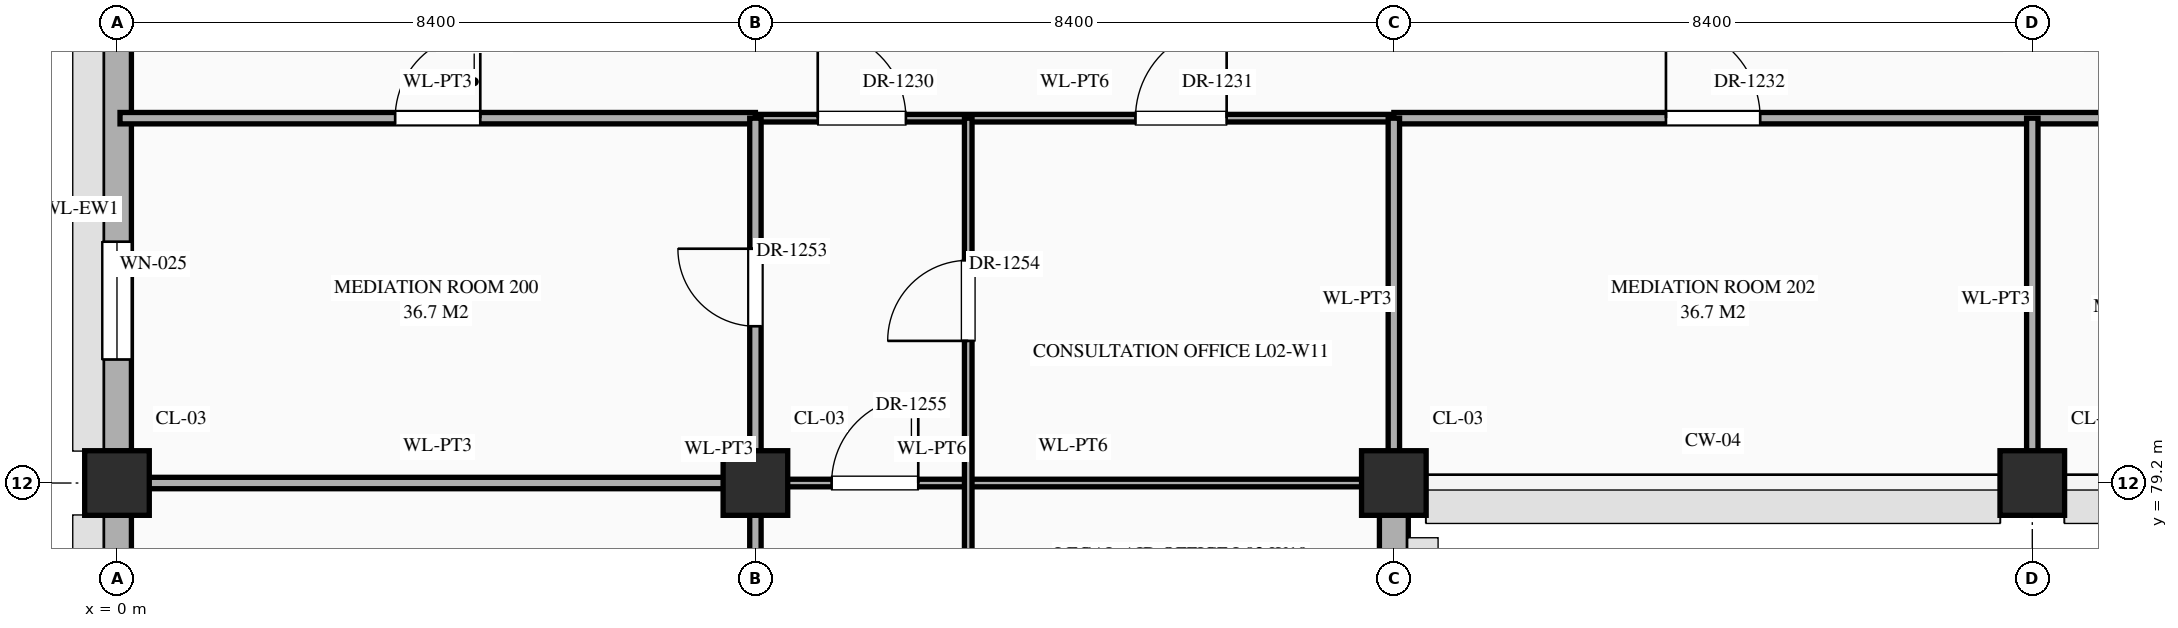
"""IFC4 building model, lengths in metres.
Left out: names, types, materials, properties, quantities, classifications, styles, units other than length and angle.
Written with IfcOpenShell. Run it as: python <this file> out.ifc"""

import sys

from ifc_helpers import new_model, si_unit, direction, frame, frame_2d, origin, origin_2d, place, context, subcontext, project, spatial, rectangle, extrude, element, fill, save


model = new_model("IFC4")
c1 = context("Model", 3, precision=1e-05, world=origin(), true_north=direction((0.0, 1.0)))
c2 = subcontext(c1, "Body", "Model", "MODEL_VIEW")
j1 = project(units=[si_unit("LENGTHUNIT", "METRE"), si_unit("PLANEANGLEUNIT", "RADIAN")], contexts=[c1])
p1 = place(None, origin())
s1 = spatial("IfcSite", under=j1, at=p1, CompositionType="ELEMENT")
p2 = place(p1, origin())
s2 = spatial("IfcBuilding", under=s1, at=p2, CompositionType="ELEMENT")
p3 = place(p2, frame((0.0, 0.0, 5.4)))
s3 = spatial("IfcBuildingStorey", under=s2, at=p3, CompositionType="ELEMENT", Elevation=5.4)
for number, where, z_axis, x_axis in (
    (1, (0.0, 79.2, 0.0), (0.0, 0.0, 1.0), (1.0, 0.0, 0.0)),
    (2, (8.4, 79.2, 0.0), (0.0, 0.0, 1.0), (1.0, 0.0, 0.0)),
    (3, (16.8, 79.2, 0.0), (0.0, 0.0, 1.0), (1.0, 0.0, 0.0)),
    (4, (25.2, 79.2, 0.0), (0.0, 0.0, 1.0), (1.0, 0.0, 0.0)),
):
    element("IfcColumn", number, at=place(p3, frame(where, z_axis=z_axis, x_axis=x_axis)), inside=s3, PredefinedType="COLUMN", context=c2, shape_type="SweptSolid", body=[
        extrude(rectangle(XDim=0.85, YDim=0.85, at=origin_2d()), origin(), (0.0, 0.0, 1.0), 5.4),
    ])
p4 = place(p3, frame((0.0, 72.42, 0.0), z_axis=(0.0, 0.0, 1.0), x_axis=(0.0, 1.0, 0.0)))
e5 = element("IfcWall", 5, at=p4, inside=s3, PredefinedType="STANDARD", context=c2, shape_type="SweptSolid", body=[
    extrude(rectangle(XDim=6.36, YDim=0.38, at=frame_2d((3.18, 0.0))), origin(), (0.0, 0.0, 1.0), 4.47),
])
p5 = place(p4, frame((2.405, 0.0, 0.85)))
e6 = element("IfcOpeningElement", 6, at=p5, cuts=e5, PredefinedType="OPENING", context=c2, shape_type="SweptSolid", body=[
    extrude(rectangle(XDim=1.55, YDim=1.2, at=frame_2d((0.775, 0.6))), frame((0.0, 0.202, 0.0), z_axis=(0.0, -1.0, 0.0), x_axis=(1.0, 0.0, 0.0)), (0.0, 0.0, 1.0), 0.404),
])
p6 = place(p3, frame((0.0, 79.62, 0.0), z_axis=(0.0, 0.0, 1.0), x_axis=(0.0, 1.0, 0.0)))
e7 = element("IfcWall", 7, at=p6, inside=s3, PredefinedType="STANDARD", context=c2, shape_type="SweptSolid", body=[
    extrude(rectangle(XDim=6.36, YDim=0.38, at=frame_2d((3.18, 0.0))), origin(), (0.0, 0.0, 1.0), 4.47),
])
p7 = place(p6, frame((1.205, 0.0, 0.85)))
e8 = element("IfcOpeningElement", 8, at=p7, cuts=e7, PredefinedType="OPENING", context=c2, shape_type="SweptSolid", body=[
    extrude(rectangle(XDim=1.55, YDim=1.38, at=frame_2d((0.775, 0.69))), frame((0.0, 0.202, 0.0), z_axis=(0.0, -1.0, 0.0), x_axis=(1.0, 0.0, 0.0)), (0.0, 0.0, 1.0), 0.404),
])
p8 = place(p3, frame((16.8, 72.42, 0.0), z_axis=(0.0, 0.0, 1.0), x_axis=(0.0, 1.0, 0.0)))
e9 = element("IfcWall", 9, at=p8, inside=s3, PredefinedType="STANDARD", context=c2, shape_type="SweptSolid", body=[
    extrude(rectangle(XDim=6.36, YDim=0.38, at=frame_2d((3.18, 0.0))), origin(), (0.0, 0.0, 1.0), 4.47),
])
p9 = place(p8, frame((2.505, 0.0, 0.85)))
e10 = element("IfcOpeningElement", 10, at=p9, cuts=e9, PredefinedType="OPENING", context=c2, shape_type="SweptSolid", body=[
    extrude(rectangle(XDim=1.35, YDim=1.92, at=frame_2d((0.675, 0.96))), frame((0.0, 0.202, 0.0), z_axis=(0.0, -1.0, 0.0), x_axis=(1.0, 0.0, 0.0)), (0.0, 0.0, 1.0), 0.404),
])
p10 = place(p3, frame((0.04, 79.2, 0.0), z_axis=(0.0, 0.0, 1.0), x_axis=(1.0, 0.0, 0.0)))
e11 = element("IfcWall", 11, at=p10, inside=s3, PredefinedType="STANDARD", context=c2, shape_type="SweptSolid", body=[
    extrude(rectangle(XDim=8.36, YDim=0.15, at=frame_2d((4.18, 0.0))), origin(), (0.0, 0.0, 1.0), 4.27),
])
p11 = place(p3, frame((8.4, 79.2, 0.0), z_axis=(0.0, 0.0, 1.0), x_axis=(1.0, 0.0, 0.0)))
e12 = element("IfcWall", 12, at=p11, inside=s3, PredefinedType="STANDARD", context=c2, shape_type="SweptSolid", body=[
    extrude(rectangle(XDim=8.36, YDim=0.1, at=frame_2d((4.18, 0.0))), origin(), (0.0, 0.0, 1.0), 4.27),
])
p12 = place(p11, frame((1.002, 0.0, 0.0)))
e13 = element("IfcOpeningElement", 13, at=p12, cuts=e12, PredefinedType="OPENING", context=c2, shape_type="SweptSolid", body=[
    extrude(rectangle(XDim=1.14, YDim=2.4, at=frame_2d((0.57, 1.2))), frame((0.0, 0.062, 0.0), z_axis=(0.0, -1.0, 0.0), x_axis=(1.0, 0.0, 0.0)), (0.0, 0.0, 1.0), 0.124),
])
p13 = place(p3, frame((0.04, 84.0, 0.0), z_axis=(0.0, 0.0, 1.0), x_axis=(1.0, 0.0, 0.0)))
e14 = element("IfcWall", 14, at=p13, inside=s3, PredefinedType="STANDARD", context=c2, shape_type="SweptSolid", body=[
    extrude(rectangle(XDim=8.36, YDim=0.15, at=frame_2d((4.18, 0.0))), origin(), (0.0, 0.0, 1.0), 5.12),
])
p14 = place(p13, frame((3.62, 0.0, 0.0)))
e15 = element("IfcOpeningElement", 15, at=p14, cuts=e14, PredefinedType="OPENING", context=c2, shape_type="SweptSolid", body=[
    extrude(rectangle(XDim=1.12, YDim=2.25, at=frame_2d((0.56, 1.125))), frame((0.0, 0.087, 0.0), z_axis=(0.0, -1.0, 0.0), x_axis=(1.0, 0.0, 0.0)), (0.0, 0.0, 1.0), 0.174),
])
p15 = place(p3, frame((8.4, 84.0, 0.0), z_axis=(0.0, 0.0, 1.0), x_axis=(1.0, 0.0, 0.0)))
e16 = element("IfcWall", 16, at=p15, inside=s3, PredefinedType="STANDARD", context=c2, shape_type="SweptSolid", body=[
    extrude(rectangle(XDim=8.4, YDim=0.1, at=frame_2d((4.2, 0.0))), origin(), (0.0, 0.0, 1.0), 5.12),
])
p16 = place(p15, frame((0.82, 0.0, 0.0)))
e17 = element("IfcOpeningElement", 17, at=p16, cuts=e16, PredefinedType="OPENING", context=c2, shape_type="SweptSolid", body=[
    extrude(rectangle(XDim=1.16, YDim=2.3, at=frame_2d((0.58, 1.15))), frame((0.0, 0.062, 0.0), z_axis=(0.0, -1.0, 0.0), x_axis=(1.0, 0.0, 0.0)), (0.0, 0.0, 1.0), 0.124),
])
p17 = place(p15, frame((5.0, 0.0, 0.0)))
e18 = element("IfcOpeningElement", 18, at=p17, cuts=e16, PredefinedType="OPENING", context=c2, shape_type="SweptSolid", body=[
    extrude(rectangle(XDim=1.2, YDim=2.35, at=frame_2d((0.6, 1.175))), frame((0.0, 0.062, 0.0), z_axis=(0.0, -1.0, 0.0), x_axis=(1.0, 0.0, 0.0)), (0.0, 0.0, 1.0), 0.124),
])
p18 = place(p3, frame((16.8, 84.0, 0.0), z_axis=(0.0, 0.0, 1.0), x_axis=(1.0, 0.0, 0.0)))
e19 = element("IfcWall", 19, at=p18, inside=s3, PredefinedType="STANDARD", context=c2, shape_type="SweptSolid", body=[
    extrude(rectangle(XDim=134.4, YDim=0.15, at=frame_2d((67.2, 0.0))), origin(), (0.0, 0.0, 1.0), 5.12),
])
p19 = place(p18, frame((3.58, 0.0, 0.0)))
e20 = element("IfcOpeningElement", 20, at=p19, cuts=e19, PredefinedType="OPENING", context=c2, shape_type="SweptSolid", body=[
    extrude(rectangle(XDim=1.24, YDim=2.3, at=frame_2d((0.62, 1.15))), frame((0.0, 0.087, 0.0), z_axis=(0.0, -1.0, 0.0), x_axis=(1.0, 0.0, 0.0)), (0.0, 0.0, 1.0), 0.174),
])
p20 = place(p18, frame((11.96, 0.0, 0.0)))
e21 = element("IfcOpeningElement", 21, at=p20, cuts=e19, PredefinedType="OPENING", context=c2, shape_type="SweptSolid", body=[
    extrude(rectangle(XDim=1.28, YDim=2.35, at=frame_2d((0.64, 1.175))), frame((0.0, 0.087, 0.0), z_axis=(0.0, -1.0, 0.0), x_axis=(1.0, 0.0, 0.0)), (0.0, 0.0, 1.0), 0.174),
])
p21 = place(p18, frame((20.53, 0.0, 0.0)))
e22 = element("IfcOpeningElement", 22, at=p21, cuts=e19, PredefinedType="OPENING", context=c2, shape_type="SweptSolid", body=[
    extrude(rectangle(XDim=0.94, YDim=2.3, at=frame_2d((0.47, 1.15))), frame((0.0, 0.087, 0.0), z_axis=(0.0, -1.0, 0.0), x_axis=(1.0, 0.0, 0.0)), (0.0, 0.0, 1.0), 0.174),
])
p22 = place(p18, frame((28.91, 0.0, 0.0)))
e23 = element("IfcOpeningElement", 23, at=p22, cuts=e19, PredefinedType="OPENING", context=c2, shape_type="SweptSolid", body=[
    extrude(rectangle(XDim=0.98, YDim=2.35, at=frame_2d((0.49, 1.175))), frame((0.0, 0.087, 0.0), z_axis=(0.0, -1.0, 0.0), x_axis=(1.0, 0.0, 0.0)), (0.0, 0.0, 1.0), 0.174),
])
p23 = place(p18, frame((37.27, 0.0, 0.0)))
e24 = element("IfcOpeningElement", 24, at=p23, cuts=e19, PredefinedType="OPENING", context=c2, shape_type="SweptSolid", body=[
    extrude(rectangle(XDim=1.06, YDim=2.4, at=frame_2d((0.53, 1.2))), frame((0.0, 0.087, 0.0), z_axis=(0.0, -1.0, 0.0), x_axis=(1.0, 0.0, 0.0)), (0.0, 0.0, 1.0), 0.174),
])
p24 = place(p18, frame((45.63, 0.0, 0.0)))
e25 = element("IfcOpeningElement", 25, at=p24, cuts=e19, PredefinedType="OPENING", context=c2, shape_type="SweptSolid", body=[
    extrude(rectangle(XDim=1.14, YDim=2.4, at=frame_2d((0.57, 1.2))), frame((0.0, 0.087, 0.0), z_axis=(0.0, -1.0, 0.0), x_axis=(1.0, 0.0, 0.0)), (0.0, 0.0, 1.0), 0.174),
])
p25 = place(p18, frame((54.15, 0.0, 0.0)))
e26 = element("IfcOpeningElement", 26, at=p25, cuts=e19, PredefinedType="OPENING", context=c2, shape_type="SweptSolid", body=[
    extrude(rectangle(XDim=0.9, YDim=2.15, at=frame_2d((0.45, 1.075))), frame((0.0, 0.087, 0.0), z_axis=(0.0, -1.0, 0.0), x_axis=(1.0, 0.0, 0.0)), (0.0, 0.0, 1.0), 0.174),
])
p26 = place(p18, frame((62.57, 0.0, 0.0)))
e27 = element("IfcOpeningElement", 27, at=p26, cuts=e19, PredefinedType="OPENING", context=c2, shape_type="SweptSolid", body=[
    extrude(rectangle(XDim=0.86, YDim=2.1, at=frame_2d((0.43, 1.05))), frame((0.0, 0.087, 0.0), z_axis=(0.0, -1.0, 0.0), x_axis=(1.0, 0.0, 0.0)), (0.0, 0.0, 1.0), 0.174),
])
p27 = place(p18, frame((70.92, 0.0, 0.0)))
e28 = element("IfcOpeningElement", 28, at=p27, cuts=e19, PredefinedType="OPENING", context=c2, shape_type="SweptSolid", body=[
    extrude(rectangle(XDim=0.96, YDim=2.2, at=frame_2d((0.48, 1.1))), frame((0.0, 0.087, 0.0), z_axis=(0.0, -1.0, 0.0), x_axis=(1.0, 0.0, 0.0)), (0.0, 0.0, 1.0), 0.174),
])
p28 = place(p18, frame((79.3, 0.0, 0.0)))
e29 = element("IfcOpeningElement", 29, at=p28, cuts=e19, PredefinedType="OPENING", context=c2, shape_type="SweptSolid", body=[
    extrude(rectangle(XDim=1.0, YDim=2.25, at=frame_2d((0.5, 1.125))), frame((0.0, 0.087, 0.0), z_axis=(0.0, -1.0, 0.0), x_axis=(1.0, 0.0, 0.0)), (0.0, 0.0, 1.0), 0.174),
])
p29 = place(p18, frame((87.68, 0.0, 0.0)))
e30 = element("IfcOpeningElement", 30, at=p29, cuts=e19, PredefinedType="OPENING", context=c2, shape_type="SweptSolid", body=[
    extrude(rectangle(XDim=1.04, YDim=2.2, at=frame_2d((0.52, 1.1))), frame((0.0, 0.087, 0.0), z_axis=(0.0, -1.0, 0.0), x_axis=(1.0, 0.0, 0.0)), (0.0, 0.0, 1.0), 0.174),
])
p30 = place(p18, frame((96.06, 0.0, 0.0)))
e31 = element("IfcOpeningElement", 31, at=p30, cuts=e19, PredefinedType="OPENING", context=c2, shape_type="SweptSolid", body=[
    extrude(rectangle(XDim=1.08, YDim=2.25, at=frame_2d((0.54, 1.125))), frame((0.0, 0.087, 0.0), z_axis=(0.0, -1.0, 0.0), x_axis=(1.0, 0.0, 0.0)), (0.0, 0.0, 1.0), 0.174),
])
p31 = place(p18, frame((104.44, 0.0, 0.0)))
e32 = element("IfcOpeningElement", 32, at=p31, cuts=e19, PredefinedType="OPENING", context=c2, shape_type="SweptSolid", body=[
    extrude(rectangle(XDim=1.12, YDim=2.25, at=frame_2d((0.56, 1.125))), frame((0.0, 0.087, 0.0), z_axis=(0.0, -1.0, 0.0), x_axis=(1.0, 0.0, 0.0)), (0.0, 0.0, 1.0), 0.174),
])
p32 = place(p18, frame((112.82, 0.0, 0.0)))
e33 = element("IfcOpeningElement", 33, at=p32, cuts=e19, PredefinedType="OPENING", context=c2, shape_type="SweptSolid", body=[
    extrude(rectangle(XDim=1.16, YDim=2.3, at=frame_2d((0.58, 1.15))), frame((0.0, 0.087, 0.0), z_axis=(0.0, -1.0, 0.0), x_axis=(1.0, 0.0, 0.0)), (0.0, 0.0, 1.0), 0.174),
])
p33 = place(p18, frame((121.2, 0.0, 0.0)))
e34 = element("IfcOpeningElement", 34, at=p33, cuts=e19, PredefinedType="OPENING", context=c2, shape_type="SweptSolid", body=[
    extrude(rectangle(XDim=1.2, YDim=2.35, at=frame_2d((0.6, 1.175))), frame((0.0, 0.087, 0.0), z_axis=(0.0, -1.0, 0.0), x_axis=(1.0, 0.0, 0.0)), (0.0, 0.0, 1.0), 0.174),
])
p34 = place(p18, frame((129.58, 0.0, 0.0)))
e35 = element("IfcOpeningElement", 35, at=p34, cuts=e19, PredefinedType="OPENING", context=c2, shape_type="SweptSolid", body=[
    extrude(rectangle(XDim=1.24, YDim=2.3, at=frame_2d((0.62, 1.15))), frame((0.0, 0.087, 0.0), z_axis=(0.0, -1.0, 0.0), x_axis=(1.0, 0.0, 0.0)), (0.0, 0.0, 1.0), 0.174),
])
p35 = place(p3, frame((8.4, 50.4, 0.0), z_axis=(0.0, 0.0, 1.0), x_axis=(0.0, 1.0, 0.0)))
e36 = element("IfcWall", 36, at=p35, inside=s3, PredefinedType="STANDARD", context=c2, shape_type="SweptSolid", body=[
    extrude(rectangle(XDim=33.6, YDim=0.15, at=frame_2d((16.8, 0.0))), origin(), (0.0, 0.0, 1.0), 4.37),
])
p36 = place(p35, frame((30.863, 0.0, 0.0)))
e37 = element("IfcOpeningElement", 37, at=p36, cuts=e36, PredefinedType="OPENING", context=c2, shape_type="SweptSolid", body=[
    extrude(rectangle(XDim=1.02, YDim=2.4, at=frame_2d((0.51, 1.2))), frame((0.0, 0.087, 0.0), z_axis=(0.0, -1.0, 0.0), x_axis=(1.0, 0.0, 0.0)), (0.0, 0.0, 1.0), 0.174),
])
p37 = place(p35, frame((3.1, 0.0, 0.0)))
e38 = element("IfcOpeningElement", 38, at=p37, cuts=e36, PredefinedType="OPENING", context=c2, shape_type="SweptSolid", body=[
    extrude(rectangle(XDim=1.0, YDim=2.25, at=frame_2d((0.5, 1.125))), frame((0.0, 0.087, 0.0), z_axis=(0.0, -1.0, 0.0), x_axis=(1.0, 0.0, 0.0)), (0.0, 0.0, 1.0), 0.174),
])
p38 = place(p35, frame((10.28, 0.0, 0.0)))
e39 = element("IfcOpeningElement", 39, at=p38, cuts=e36, PredefinedType="OPENING", context=c2, shape_type="SweptSolid", body=[
    extrude(rectangle(XDim=1.04, YDim=2.2, at=frame_2d((0.52, 1.1))), frame((0.0, 0.087, 0.0), z_axis=(0.0, -1.0, 0.0), x_axis=(1.0, 0.0, 0.0)), (0.0, 0.0, 1.0), 0.174),
])
p39 = place(p35, frame((17.46, 0.0, 0.0)))
e40 = element("IfcOpeningElement", 40, at=p39, cuts=e36, PredefinedType="OPENING", context=c2, shape_type="SweptSolid", body=[
    extrude(rectangle(XDim=1.08, YDim=2.25, at=frame_2d((0.54, 1.125))), frame((0.0, 0.087, 0.0), z_axis=(0.0, -1.0, 0.0), x_axis=(1.0, 0.0, 0.0)), (0.0, 0.0, 1.0), 0.174),
])
p40 = place(p35, frame((24.64, 0.0, 0.0)))
e41 = element("IfcOpeningElement", 41, at=p40, cuts=e36, PredefinedType="OPENING", context=c2, shape_type="SweptSolid", body=[
    extrude(rectangle(XDim=1.12, YDim=2.25, at=frame_2d((0.56, 1.125))), frame((0.0, 0.087, 0.0), z_axis=(0.0, -1.0, 0.0), x_axis=(1.0, 0.0, 0.0)), (0.0, 0.0, 1.0), 0.174),
])
p41 = place(p3, frame((11.2, 43.2, 0.0), z_axis=(0.0, 0.0, 1.0), x_axis=(0.0, 1.0, 0.0)))
e42 = element("IfcWall", 42, at=p41, inside=s3, PredefinedType="STANDARD", context=c2, shape_type="SweptSolid", body=[
    extrude(rectangle(XDim=40.8, YDim=0.1, at=frame_2d((20.4, 0.0))), origin(), (0.0, 0.0, 1.0), 5.12),
])
p42 = place(p41, frame((37.87, 0.0, 0.0)))
e43 = element("IfcOpeningElement", 43, at=p42, cuts=e42, PredefinedType="OPENING", context=c2, shape_type="SweptSolid", body=[
    extrude(rectangle(XDim=1.06, YDim=2.4, at=frame_2d((0.53, 1.2))), frame((0.0, 0.062, 0.0), z_axis=(0.0, -1.0, 0.0), x_axis=(1.0, 0.0, 0.0)), (0.0, 0.0, 1.0), 0.124),
])
p43 = place(p41, frame((3.09, 0.0, 0.0)))
e44 = element("IfcOpeningElement", 44, at=p43, cuts=e42, PredefinedType="OPENING", context=c2, shape_type="SweptSolid", body=[
    extrude(rectangle(XDim=1.02, YDim=2.4, at=frame_2d((0.51, 1.2))), frame((0.0, 0.062, 0.0), z_axis=(0.0, -1.0, 0.0), x_axis=(1.0, 0.0, 0.0)), (0.0, 0.0, 1.0), 0.124),
])
p44 = place(p41, frame((10.27, 0.0, 0.0)))
e45 = element("IfcOpeningElement", 45, at=p44, cuts=e42, PredefinedType="OPENING", context=c2, shape_type="SweptSolid", body=[
    extrude(rectangle(XDim=1.06, YDim=2.4, at=frame_2d((0.53, 1.2))), frame((0.0, 0.062, 0.0), z_axis=(0.0, -1.0, 0.0), x_axis=(1.0, 0.0, 0.0)), (0.0, 0.0, 1.0), 0.124),
])
p45 = place(p41, frame((17.43, 0.0, 0.0)))
e46 = element("IfcOpeningElement", 46, at=p45, cuts=e42, PredefinedType="OPENING", context=c2, shape_type="SweptSolid", body=[
    extrude(rectangle(XDim=1.14, YDim=2.4, at=frame_2d((0.57, 1.2))), frame((0.0, 0.062, 0.0), z_axis=(0.0, -1.0, 0.0), x_axis=(1.0, 0.0, 0.0)), (0.0, 0.0, 1.0), 0.124),
])
p46 = place(p41, frame((24.75, 0.0, 0.0)))
e47 = element("IfcOpeningElement", 47, at=p46, cuts=e42, PredefinedType="OPENING", context=c2, shape_type="SweptSolid", body=[
    extrude(rectangle(XDim=0.9, YDim=2.15, at=frame_2d((0.45, 1.075))), frame((0.0, 0.062, 0.0), z_axis=(0.0, -1.0, 0.0), x_axis=(1.0, 0.0, 0.0)), (0.0, 0.0, 1.0), 0.124),
])
p47 = place(p41, frame((31.97, 0.0, 0.0)))
e48 = element("IfcOpeningElement", 48, at=p47, cuts=e42, PredefinedType="OPENING", context=c2, shape_type="SweptSolid", body=[
    extrude(rectangle(XDim=0.86, YDim=2.1, at=frame_2d((0.43, 1.05))), frame((0.0, 0.062, 0.0), z_axis=(0.0, -1.0, 0.0), x_axis=(1.0, 0.0, 0.0)), (0.0, 0.0, 1.0), 0.124),
])
for number, where, z_axis, x_axis in (
    (49, (16.8, 79.24, 0.0), (0.0, 0.0, 1.0), (0.0, 1.0, 0.0)),
    (50, (25.2, 79.24, 0.0), (0.0, 0.0, 1.0), (0.0, 1.0, 0.0)),
):
    element("IfcWall", number, at=place(p3, frame(where, z_axis=z_axis, x_axis=x_axis)), inside=s3, PredefinedType="STANDARD", context=c2, shape_type="SweptSolid", body=[
        extrude(rectangle(XDim=4.76, YDim=0.15, at=frame_2d((2.38, 0.0))), origin(), (0.0, 0.0, 1.0), 4.37),
    ])
p48 = place(p7, origin())
e51 = element("IfcWindow", 51, at=p48, inside=s3, PartitioningType="SINGLE_PANEL", PredefinedType="WINDOW", context=c2, shape_type="SweptSolid", body=[
    extrude(rectangle(XDim=1.55, YDim=1.38, at=frame_2d((0.775, 0.69))), frame((0.0, 0.03, 0.0), z_axis=(0.0, -1.0, 0.0), x_axis=(1.0, 0.0, 0.0)), (0.0, 0.0, 1.0), 0.06),
])
fill(e8, e51)
p49 = place(p14, origin())
e52 = element("IfcDoor", 52, at=p49, inside=s3, OperationType="SINGLE_SWING_RIGHT", PredefinedType="DOOR", context=c2, shape_type="SweptSolid", body=[
    extrude(rectangle(XDim=1.12, YDim=2.25, at=frame_2d((0.56, 1.125))), frame((0.0, 0.025, 0.0), z_axis=(0.0, -1.0, 0.0), x_axis=(1.0, 0.0, 0.0)), (0.0, 0.0, 1.0), 0.05),
])
fill(e15, e52)
p50 = place(p16, origin())
e53 = element("IfcDoor", 53, at=p50, inside=s3, OperationType="SINGLE_SWING_LEFT", PredefinedType="DOOR", context=c2, shape_type="SweptSolid", body=[
    extrude(rectangle(XDim=1.16, YDim=2.3, at=frame_2d((0.58, 1.15))), frame((0.0, 0.025, 0.0), z_axis=(0.0, -1.0, 0.0), x_axis=(1.0, 0.0, 0.0)), (0.0, 0.0, 1.0), 0.05),
])
fill(e17, e53)
p51 = place(p17, origin())
e54 = element("IfcDoor", 54, at=p51, inside=s3, OperationType="SINGLE_SWING_RIGHT", PredefinedType="DOOR", context=c2, shape_type="SweptSolid", body=[
    extrude(rectangle(XDim=1.2, YDim=2.35, at=frame_2d((0.6, 1.175))), frame((0.0, 0.025, 0.0), z_axis=(0.0, -1.0, 0.0), x_axis=(1.0, 0.0, 0.0)), (0.0, 0.0, 1.0), 0.05),
])
fill(e18, e54)
p52 = place(p19, origin())
e55 = element("IfcDoor", 55, at=p52, inside=s3, OperationType="SINGLE_SWING_LEFT", PredefinedType="DOOR", context=c2, shape_type="SweptSolid", body=[
    extrude(rectangle(XDim=1.24, YDim=2.3, at=frame_2d((0.62, 1.15))), frame((0.0, 0.025, 0.0), z_axis=(0.0, -1.0, 0.0), x_axis=(1.0, 0.0, 0.0)), (0.0, 0.0, 1.0), 0.05),
])
fill(e20, e55)
p53 = place(p36, origin())
e56 = element("IfcDoor", 56, at=p53, inside=s3, OperationType="SINGLE_SWING_RIGHT", PredefinedType="DOOR", context=c2, shape_type="SweptSolid", body=[
    extrude(rectangle(XDim=1.02, YDim=2.4, at=frame_2d((0.51, 1.2))), frame((0.0, 0.025, 0.0), z_axis=(0.0, -1.0, 0.0), x_axis=(1.0, 0.0, 0.0)), (0.0, 0.0, 1.0), 0.05),
])
fill(e37, e56)
p54 = place(p42, origin())
e57 = element("IfcDoor", 57, at=p54, inside=s3, OperationType="SINGLE_SWING_LEFT", PredefinedType="DOOR", context=c2, shape_type="SweptSolid", body=[
    extrude(rectangle(XDim=1.06, YDim=2.4, at=frame_2d((0.53, 1.2))), frame((0.0, 0.025, 0.0), z_axis=(0.0, -1.0, 0.0), x_axis=(1.0, 0.0, 0.0)), (0.0, 0.0, 1.0), 0.05),
])
fill(e43, e57)
p55 = place(p12, origin())
e58 = element("IfcDoor", 58, at=p55, inside=s3, OperationType="SINGLE_SWING_RIGHT", PredefinedType="DOOR", context=c2, shape_type="SweptSolid", body=[
    extrude(rectangle(XDim=1.14, YDim=2.4, at=frame_2d((0.57, 1.2))), frame((0.0, 0.025, 0.0), z_axis=(0.0, -1.0, 0.0), x_axis=(1.0, 0.0, 0.0)), (0.0, 0.0, 1.0), 0.05),
])
fill(e13, e58)
save(model, sys.argv[1])
